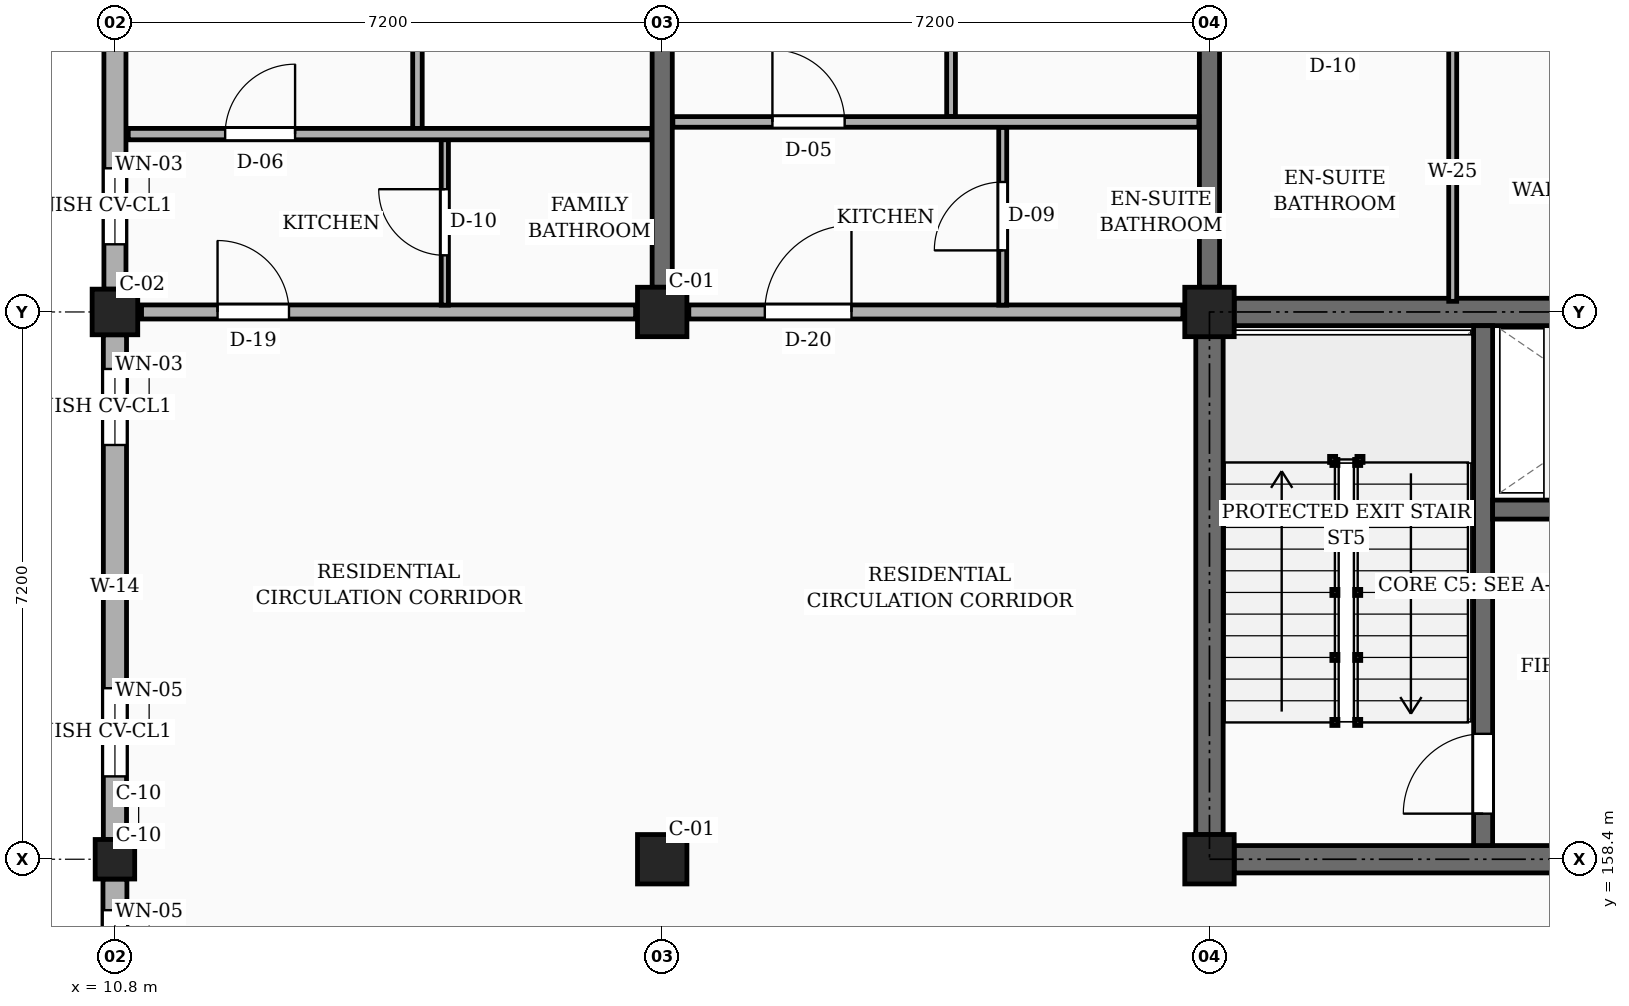
"""IFC4 building model, lengths in metres.
Left out: names, types, materials, properties, quantities, classifications, styles, units other than length and angle.
Written with IfcOpenShell. Run it as: python <this file> out.ifc"""

import sys

from ifc_helpers import new_model, si_unit, direction, frame, frame_2d, origin, origin_2d, place, context, subcontext, project, spatial, rectangle, circle, extrude, element, fill, save


model = new_model("IFC4")
c1 = context("Model", 3, precision=1e-05, world=origin(), true_north=direction((0.0, 1.0)))
c2 = subcontext(c1, "Body", "Model", "MODEL_VIEW")
j1 = project(units=[si_unit("LENGTHUNIT", "METRE"), si_unit("PLANEANGLEUNIT", "RADIAN")], contexts=[c1])
p1 = place(None, origin())
s1 = spatial("IfcSite", under=j1, at=p1, CompositionType="ELEMENT")
p2 = place(p1, origin())
s2 = spatial("IfcBuilding", under=s1, at=p2, CompositionType="ELEMENT")
p3 = place(p2, origin())
s3 = spatial("IfcBuildingStorey", under=s2, at=p3, CompositionType="ELEMENT", Elevation=0.0)
p4 = place(p3, frame((10.8, 158.4, 0.0), z_axis=(0.0, 0.0, 1.0), x_axis=(1.0, 0.0, 0.0)))
e1 = element("IfcColumn", 1, at=p4, inside=s3, PredefinedType="COLUMN", context=c2, shape_type="SweptSolid", body=[
    extrude(circle(Radius=0.26, at=origin_2d()), origin(), (0.0, 0.0, 1.0), 4.5),
])
p5 = place(p3, frame((10.8, 165.6, 0.0), z_axis=(0.0, 0.0, 1.0), x_axis=(1.0, 0.0, 0.0)))
e2 = element("IfcColumn", 2, at=p5, inside=s3, PredefinedType="COLUMN", context=c2, shape_type="SweptSolid", body=[
    extrude(rectangle(XDim=0.6, YDim=0.6, at=origin_2d()), origin(), (0.0, 0.0, 1.0), 4.5),
])
for number, where, z_axis, x_axis in (
    (3, (18.0, 158.4, 0.0), (0.0, 0.0, 1.0), (1.0, 0.0, 0.0)),
    (4, (18.0, 165.6, 0.0), (0.0, 0.0, 1.0), (1.0, 0.0, 0.0)),
    (5, (25.2, 158.4, 0.0), (0.0, 0.0, 1.0), (1.0, 0.0, 0.0)),
    (6, (25.2, 165.6, 0.0), (0.0, 0.0, 1.0), (1.0, 0.0, 0.0)),
):
    element("IfcColumn", number, at=place(p3, frame(where, z_axis=z_axis, x_axis=x_axis)), inside=s3, PredefinedType="COLUMN", context=c2, shape_type="SweptSolid", body=[
        extrude(rectangle(XDim=0.65, YDim=0.65, at=origin_2d()), origin(), (0.0, 0.0, 1.0), 4.5),
    ])
p6 = place(p3, frame((18.0, 165.925, 0.0), z_axis=(0.0, 0.0, 1.0), x_axis=(0.0, 1.0, 0.0)))
e7 = element("IfcWall", 7, at=p6, inside=s3, PredefinedType="SOLIDWALL", context=c2, shape_type="SweptSolid", body=[
    extrude(rectangle(XDim=6.575, YDim=0.265, at=frame_2d((3.288, 0.0))), origin(), (0.0, 0.0, 1.0), 3.535),
])
p7 = place(p3, frame((25.2, 165.925, 0.0), z_axis=(0.0, 0.0, 1.0), x_axis=(0.0, 1.0, 0.0)))
e8 = element("IfcWall", 8, at=p7, inside=s3, PredefinedType="SOLIDWALL", context=c2, shape_type="SweptSolid", body=[
    extrude(rectangle(XDim=6.615, YDim=0.265, at=frame_2d((3.308, 0.0))), origin(), (0.0, 0.0, 1.0), 3.535),
])
p8 = place(p7, frame((4.15, 0.0, 0.0)))
e9 = element("IfcOpeningElement", 9, at=p8, cuts=e8, PredefinedType="OPENING", context=c2, shape_type="SweptSolid", body=[
    extrude(rectangle(XDim=0.98, YDim=2.12, at=frame_2d((0.49, 1.06))), frame((0.0, 0.143, 0.0), z_axis=(0.0, -1.0, 0.0), x_axis=(1.0, 0.0, 0.0)), (0.0, 0.0, 1.0), 0.285),
])
p9 = place(p3, frame((10.8, 172.5, 0.0), z_axis=(0.0, 0.0, 1.0), x_axis=(0.0, -1.0, 0.0)))
e10 = element("IfcWall", 10, at=p9, inside=s3, PredefinedType="SOLIDWALL", context=c2, shape_type="SweptSolid", body=[
    extrude(rectangle(XDim=6.6, YDim=0.29, at=frame_2d((3.3, 0.0))), origin(), (0.0, 0.0, 1.0), 3.805),
])
p10 = place(p9, frame((1.925, 0.0, 0.78)))
e11 = element("IfcOpeningElement", 11, at=p10, cuts=e10, PredefinedType="OPENING", context=c2, shape_type="SweptSolid", body=[
    extrude(rectangle(XDim=0.85, YDim=1.15, at=frame_2d((0.425, 0.575))), frame((0.0, 0.155, 0.0), z_axis=(0.0, -1.0, 0.0), x_axis=(1.0, 0.0, 0.0)), (0.0, 0.0, 1.0), 0.31),
])
p11 = place(p9, frame((5.01, 0.0, 0.78)))
e12 = element("IfcOpeningElement", 12, at=p11, cuts=e10, PredefinedType="OPENING", context=c2, shape_type="SweptSolid", body=[
    extrude(rectangle(XDim=1.0, YDim=1.15, at=frame_2d((0.5, 0.575))), frame((0.0, 0.155, 0.0), z_axis=(0.0, -1.0, 0.0), x_axis=(1.0, 0.0, 0.0)), (0.0, 0.0, 1.0), 0.31),
])
p12 = place(p3, frame((10.8, 165.3, 0.0), z_axis=(0.0, 0.0, 1.0), x_axis=(0.0, -1.0, 0.0)))
e13 = element("IfcWall", 13, at=p12, inside=s3, PredefinedType="SOLIDWALL", context=c2, shape_type="SweptSolid", body=[
    extrude(rectangle(XDim=6.64, YDim=0.305, at=frame_2d((3.32, 0.0))), origin(), (0.0, 0.0, 1.0), 3.805),
])
p13 = place(p12, frame((0.45, 0.0, 0.78)))
e14 = element("IfcOpeningElement", 14, at=p13, cuts=e13, PredefinedType="OPENING", context=c2, shape_type="SweptSolid", body=[
    extrude(rectangle(XDim=1.0, YDim=1.15, at=frame_2d((0.5, 0.575))), frame((0.0, 0.163, 0.0), z_axis=(0.0, -1.0, 0.0), x_axis=(1.0, 0.0, 0.0)), (0.0, 0.0, 1.0), 0.325),
])
p14 = place(p12, frame((4.65, 0.0, 0.78)))
e15 = element("IfcOpeningElement", 15, at=p14, cuts=e13, PredefinedType="OPENING", context=c2, shape_type="SweptSolid", body=[
    extrude(rectangle(XDim=1.16, YDim=1.15, at=frame_2d((0.58, 0.575))), frame((0.0, 0.163, 0.0), z_axis=(0.0, -1.0, 0.0), x_axis=(1.0, 0.0, 0.0)), (0.0, 0.0, 1.0), 0.325),
])
p15 = place(p3, frame((10.8, 158.14, 0.0), z_axis=(0.0, 0.0, 1.0), x_axis=(0.0, -1.0, 0.0)))
e16 = element("IfcWall", 16, at=p15, inside=s3, PredefinedType="SOLIDWALL", context=c2, shape_type="SweptSolid", body=[
    extrude(rectangle(XDim=6.64, YDim=0.315, at=frame_2d((3.32, 0.0))), origin(), (0.0, 0.0, 1.0), 3.805),
])
p16 = place(p15, frame((0.41, 0.0, 0.78)))
e17 = element("IfcOpeningElement", 17, at=p16, cuts=e16, PredefinedType="OPENING", context=c2, shape_type="SweptSolid", body=[
    extrude(rectangle(XDim=1.16, YDim=1.15, at=frame_2d((0.58, 0.575))), frame((0.0, 0.167, 0.0), z_axis=(0.0, -1.0, 0.0), x_axis=(1.0, 0.0, 0.0)), (0.0, 0.0, 1.0), 0.335),
])
p17 = place(p15, frame((2.77, 0.0, 0.78)))
e18 = element("IfcOpeningElement", 18, at=p17, cuts=e16, PredefinedType="OPENING", context=c2, shape_type="SweptSolid", body=[
    extrude(rectangle(XDim=1.32, YDim=1.15, at=frame_2d((0.66, 0.575))), frame((0.0, 0.167, 0.0), z_axis=(0.0, -1.0, 0.0), x_axis=(1.0, 0.0, 0.0)), (0.0, 0.0, 1.0), 0.335),
])
p18 = place(p15, frame((5.32, 0.0, 0.78)))
e19 = element("IfcOpeningElement", 19, at=p18, cuts=e16, PredefinedType="OPENING", context=c2, shape_type="SweptSolid", body=[
    extrude(rectangle(XDim=0.88, YDim=1.26, at=frame_2d((0.44, 0.63))), frame((0.0, 0.167, 0.0), z_axis=(0.0, -1.0, 0.0), x_axis=(1.0, 0.0, 0.0)), (0.0, 0.0, 1.0), 0.335),
])
p19 = place(p3, frame((25.2, 158.725, 0.0), z_axis=(0.0, 0.0, 1.0), x_axis=(0.0, 1.0, 0.0)))
e20 = element("IfcWall", 20, at=p19, inside=s3, PredefinedType="SHEAR", context=c2, shape_type="SweptSolid", body=[
    extrude(rectangle(XDim=6.55, YDim=0.36, at=frame_2d((3.275, 0.0))), origin(), (0.0, 0.0, 1.0), 4.235),
])
p20 = place(p3, frame((25.525, 165.6, 0.0), z_axis=(0.0, 0.0, 1.0), x_axis=(1.0, 0.0, 0.0)))
e21 = element("IfcWall", 21, at=p20, inside=s3, PredefinedType="SHEAR", context=c2, shape_type="SweptSolid", body=[
    extrude(rectangle(XDim=6.55, YDim=0.36, at=frame_2d((3.275, 0.0))), origin(), (0.0, 0.0, 1.0), 4.235),
])
p21 = place(p3, frame((25.525, 158.4, 0.0), z_axis=(0.0, 0.0, 1.0), x_axis=(1.0, 0.0, 0.0)))
e22 = element("IfcWall", 22, at=p21, inside=s3, PredefinedType="SHEAR", context=c2, shape_type="SweptSolid", body=[
    extrude(rectangle(XDim=6.55, YDim=0.36, at=frame_2d((3.275, 0.0))), origin(), (0.0, 0.0, 1.0), 4.235),
])
p22 = place(p21, frame((4.425, 0.0, 0.0)))
e23 = element("IfcOpeningElement", 23, at=p22, cuts=e22, PredefinedType="OPENING", context=c2, shape_type="SweptSolid", body=[
    extrude(rectangle(XDim=1.1, YDim=2.15, at=frame_2d((0.55, 1.075))), frame((0.0, 0.19, 0.0), z_axis=(0.0, -1.0, 0.0), x_axis=(1.0, 0.0, 0.0)), (0.0, 0.0, 1.0), 0.38),
])
p23 = place(p3, frame((28.8, 158.58, 0.0), z_axis=(0.0, 0.0, 1.0), x_axis=(0.0, 1.0, 0.0)))
e24 = element("IfcWall", 24, at=p23, inside=s3, PredefinedType="SHEAR", context=c2, shape_type="SweptSolid", body=[
    extrude(rectangle(XDim=6.84, YDim=0.25, at=frame_2d((3.42, 0.0))), origin(), (0.0, 0.0, 1.0), 4.235),
])
p24 = place(p23, frame((0.42, 0.0, 0.0)))
e25 = element("IfcOpeningElement", 25, at=p24, cuts=e24, PredefinedType="OPENING", context=c2, shape_type="SweptSolid", body=[
    extrude(rectangle(XDim=1.05, YDim=2.15, at=frame_2d((0.525, 1.075))), frame((0.0, 0.135, 0.0), z_axis=(0.0, -1.0, 0.0), x_axis=(1.0, 0.0, 0.0)), (0.0, 0.0, 1.0), 0.27),
])
p25 = place(p3, frame((28.925, 163.0, 0.0), z_axis=(0.0, 0.0, 1.0), x_axis=(1.0, 0.0, 0.0)))
e26 = element("IfcWall", 26, at=p25, inside=s3, PredefinedType="SHEAR", context=c2, shape_type="SweptSolid", body=[
    extrude(rectangle(XDim=3.295, YDim=0.25, at=frame_2d((1.647, 0.0))), origin(), (0.0, 0.0, 1.0), 4.235),
])
p26 = place(p25, frame((1.1, 0.0, 0.0)))
e27 = element("IfcOpeningElement", 27, at=p26, cuts=e26, PredefinedType="OPENING", context=c2, shape_type="SweptSolid", body=[
    extrude(rectangle(XDim=1.1, YDim=2.2, at=frame_2d((0.55, 1.1))), frame((0.0, 0.135, 0.0), z_axis=(0.0, -1.0, 0.0), x_axis=(1.0, 0.0, 0.0)), (0.0, 0.0, 1.0), 0.27),
])
p27 = place(p3, frame((11.15, 165.6, 0.0), z_axis=(0.0, 0.0, 1.0), x_axis=(1.0, 0.0, 0.0)))
e28 = element("IfcWall", 28, at=p27, inside=s3, PredefinedType="PARTITIONING", context=c2, shape_type="SweptSolid", body=[
    extrude(rectangle(XDim=6.5, YDim=0.185, at=frame_2d((3.25, 0.0))), origin(), (0.0, 0.0, 1.0), 3.435),
])
p28 = place(p27, frame((1.0, 0.0, 0.0)))
e29 = element("IfcOpeningElement", 29, at=p28, cuts=e28, PredefinedType="OPENING", context=c2, shape_type="SweptSolid", body=[
    extrude(rectangle(XDim=0.94, YDim=2.12, at=frame_2d((0.47, 1.06))), frame((0.0, 0.103, 0.0), z_axis=(0.0, -1.0, 0.0), x_axis=(1.0, 0.0, 0.0)), (0.0, 0.0, 1.0), 0.205),
])
p29 = place(p3, frame((18.35, 165.6, 0.0), z_axis=(0.0, 0.0, 1.0), x_axis=(1.0, 0.0, 0.0)))
e30 = element("IfcWall", 30, at=p29, inside=s3, PredefinedType="PARTITIONING", context=c2, shape_type="SweptSolid", body=[
    extrude(rectangle(XDim=6.5, YDim=0.185, at=frame_2d((3.25, 0.0))), origin(), (0.0, 0.0, 1.0), 3.435),
])
p30 = place(p29, frame((1.0, 0.0, 0.0)))
e31 = element("IfcOpeningElement", 31, at=p30, cuts=e30, PredefinedType="OPENING", context=c2, shape_type="SweptSolid", body=[
    extrude(rectangle(XDim=1.14, YDim=2.18, at=frame_2d((0.57, 1.09))), frame((0.0, 0.103, 0.0), z_axis=(0.0, -1.0, 0.0), x_axis=(1.0, 0.0, 0.0)), (0.0, 0.0, 1.0), 0.205),
])
p31 = place(p3, frame((14.78, 168.01, 0.0), z_axis=(0.0, 0.0, 1.0), x_axis=(0.0, 1.0, 0.0)))
e32 = element("IfcWall", 32, at=p31, inside=s3, PredefinedType="PARTITIONING", context=c2, shape_type="SweptSolid", body=[
    extrude(rectangle(XDim=4.615, YDim=0.125, at=frame_2d((2.308, 0.0))), origin(), (0.0, 0.0, 1.0), 3.67),
])
p32 = place(p31, frame((1.867, 0.0, 0.0)))
e33 = element("IfcOpeningElement", 33, at=p32, cuts=e32, PredefinedType="OPENING", context=c2, shape_type="SweptSolid", body=[
    extrude(rectangle(XDim=0.88, YDim=2.08, at=frame_2d((0.44, 1.04))), frame((0.0, 0.073, 0.0), z_axis=(0.0, -1.0, 0.0), x_axis=(1.0, 0.0, 0.0)), (0.0, 0.0, 1.0), 0.145),
])
p33 = place(p3, frame((15.14, 165.69, 0.0), z_axis=(0.0, 0.0, 1.0), x_axis=(0.0, 1.0, 0.0)))
e34 = element("IfcWall", 34, at=p33, inside=s3, PredefinedType="PARTITIONING", context=c2, shape_type="SweptSolid", body=[
    extrude(rectangle(XDim=2.18, YDim=0.095, at=frame_2d((1.09, 0.0))), origin(), (0.0, 0.0, 1.0), 3.67),
])
p34 = place(p33, frame((0.655, 0.0, 0.0)))
e35 = element("IfcOpeningElement", 35, at=p34, cuts=e34, PredefinedType="OPENING", context=c2, shape_type="SweptSolid", body=[
    extrude(rectangle(XDim=0.87, YDim=2.05, at=frame_2d((0.435, 1.025))), frame((0.0, 0.058, 0.0), z_axis=(0.0, -1.0, 0.0), x_axis=(1.0, 0.0, 0.0)), (0.0, 0.0, 1.0), 0.115),
])
p35 = place(p3, frame((10.975, 167.94, 0.0), z_axis=(0.0, 0.0, 1.0), x_axis=(1.0, 0.0, 0.0)))
e36 = element("IfcWall", 36, at=p35, inside=s3, PredefinedType="PARTITIONING", context=c2, shape_type="SweptSolid", body=[
    extrude(rectangle(XDim=6.885, YDim=0.15, at=frame_2d((3.442, 0.0))), origin(), (0.0, 0.0, 1.0), 3.67),
])
p36 = place(p35, frame((1.275, 0.0, 0.0)))
e37 = element("IfcOpeningElement", 37, at=p36, cuts=e36, PredefinedType="OPENING", context=c2, shape_type="SweptSolid", body=[
    extrude(rectangle(XDim=0.92, YDim=2.1, at=frame_2d((0.46, 1.05))), frame((0.0, 0.085, 0.0), z_axis=(0.0, -1.0, 0.0), x_axis=(1.0, 0.0, 0.0)), (0.0, 0.0, 1.0), 0.17),
])
p37 = place(p3, frame((21.8, 168.17, 0.0), z_axis=(0.0, 0.0, 1.0), x_axis=(0.0, 1.0, 0.0)))
e38 = element("IfcWall", 38, at=p37, inside=s3, PredefinedType="PARTITIONING", context=c2, shape_type="SweptSolid", body=[
    extrude(rectangle(XDim=4.455, YDim=0.115, at=frame_2d((2.228, 0.0))), origin(), (0.0, 0.0, 1.0), 3.67),
])
p38 = place(p37, frame((1.778, 0.0, 0.0)))
e39 = element("IfcOpeningElement", 39, at=p38, cuts=e38, PredefinedType="OPENING", context=c2, shape_type="SweptSolid", body=[
    extrude(rectangle(XDim=0.9, YDim=2.1, at=frame_2d((0.45, 1.05))), frame((0.0, 0.067, 0.0), z_axis=(0.0, -1.0, 0.0), x_axis=(1.0, 0.0, 0.0)), (0.0, 0.0, 1.0), 0.135),
])
p39 = place(p3, frame((22.48, 165.69, 0.0), z_axis=(0.0, 0.0, 1.0), x_axis=(0.0, 1.0, 0.0)))
e40 = element("IfcWall", 40, at=p39, inside=s3, PredefinedType="PARTITIONING", context=c2, shape_type="SweptSolid", body=[
    extrude(rectangle(XDim=2.34, YDim=0.105, at=frame_2d((1.17, 0.0))), origin(), (0.0, 0.0, 1.0), 3.67),
])
p40 = place(p39, frame((0.72, 0.0, 0.0)))
e41 = element("IfcOpeningElement", 41, at=p40, cuts=e40, PredefinedType="OPENING", context=c2, shape_type="SweptSolid", body=[
    extrude(rectangle(XDim=0.9, YDim=2.05, at=frame_2d((0.45, 1.025))), frame((0.0, 0.062, 0.0), z_axis=(0.0, -1.0, 0.0), x_axis=(1.0, 0.0, 0.0)), (0.0, 0.0, 1.0), 0.125),
])
p41 = place(p3, frame((18.14, 168.1, 0.0), z_axis=(0.0, 0.0, 1.0), x_axis=(1.0, 0.0, 0.0)))
e42 = element("IfcWall", 42, at=p41, inside=s3, PredefinedType="PARTITIONING", context=c2, shape_type="SweptSolid", body=[
    extrude(rectangle(XDim=6.92, YDim=0.14, at=frame_2d((3.46, 0.0))), origin(), (0.0, 0.0, 1.0), 3.67),
])
p42 = place(p41, frame((1.31, 0.0, 0.0)))
e43 = element("IfcOpeningElement", 43, at=p42, cuts=e42, PredefinedType="OPENING", context=c2, shape_type="SweptSolid", body=[
    extrude(rectangle(XDim=0.95, YDim=2.1, at=frame_2d((0.475, 1.05))), frame((0.0, 0.08, 0.0), z_axis=(0.0, -1.0, 0.0), x_axis=(1.0, 0.0, 0.0)), (0.0, 0.0, 1.0), 0.16),
])
p43 = place(p3, frame((28.4, 165.74, 0.0), z_axis=(0.0, 0.0, 1.0), x_axis=(0.0, 1.0, 0.0)))
e44 = element("IfcWall", 44, at=p43, inside=s3, PredefinedType="PARTITIONING", context=c2, shape_type="SweptSolid", body=[
    extrude(rectangle(XDim=3.39, YDim=0.105, at=frame_2d((1.695, 0.0))), origin(), (0.0, 0.0, 1.0), 3.67),
])
p44 = place(p11, origin())
e45 = element("IfcWindow", 45, at=p44, inside=s3, PartitioningType="SINGLE_PANEL", PredefinedType="WINDOW", context=c2, shape_type="SweptSolid", body=[
    extrude(rectangle(XDim=1.0, YDim=1.15, at=frame_2d((0.5, 0.575))), frame((0.0, 0.03, 0.0), z_axis=(0.0, -1.0, 0.0), x_axis=(1.0, 0.0, 0.0)), (0.0, 0.0, 1.0), 0.06),
])
fill(e12, e45)
p45 = place(p13, origin())
e46 = element("IfcWindow", 46, at=p45, inside=s3, PartitioningType="SINGLE_PANEL", PredefinedType="WINDOW", context=c2, shape_type="SweptSolid", body=[
    extrude(rectangle(XDim=1.0, YDim=1.15, at=frame_2d((0.5, 0.575))), frame((0.0, 0.03, 0.0), z_axis=(0.0, -1.0, 0.0), x_axis=(1.0, 0.0, 0.0)), (0.0, 0.0, 1.0), 0.06),
])
fill(e14, e46)
p46 = place(p14, origin())
e47 = element("IfcWindow", 47, at=p46, inside=s3, PartitioningType="SINGLE_PANEL", PredefinedType="WINDOW", context=c2, shape_type="SweptSolid", body=[
    extrude(rectangle(XDim=1.16, YDim=1.15, at=frame_2d((0.58, 0.575))), frame((0.0, 0.03, 0.0), z_axis=(0.0, -1.0, 0.0), x_axis=(1.0, 0.0, 0.0)), (0.0, 0.0, 1.0), 0.06),
])
fill(e15, e47)
p47 = place(p16, origin())
e48 = element("IfcWindow", 48, at=p47, inside=s3, PartitioningType="SINGLE_PANEL", PredefinedType="WINDOW", context=c2, shape_type="SweptSolid", body=[
    extrude(rectangle(XDim=1.16, YDim=1.15, at=frame_2d((0.58, 0.575))), frame((0.0, 0.03, 0.0), z_axis=(0.0, -1.0, 0.0), x_axis=(1.0, 0.0, 0.0)), (0.0, 0.0, 1.0), 0.06),
])
fill(e17, e48)
p48 = place(p24, frame((1.05, 0.0, 0.0), z_axis=(0.0, 0.0, 1.0), x_axis=(-1.0, 0.0, 0.0)))
e49 = element("IfcDoor", 49, at=p48, inside=s3, OperationType="SINGLE_SWING_LEFT", PredefinedType="DOOR", context=c2, shape_type="SweptSolid", body=[
    extrude(rectangle(XDim=1.05, YDim=2.15, at=frame_2d((0.525, 1.075))), frame((0.0, 0.025, 0.0), z_axis=(0.0, -1.0, 0.0), x_axis=(1.0, 0.0, 0.0)), (0.0, 0.0, 1.0), 0.05),
])
fill(e25, e49)
p49 = place(p28, origin())
e50 = element("IfcDoor", 50, at=p49, inside=s3, OperationType="SINGLE_SWING_LEFT", PredefinedType="DOOR", context=c2, shape_type="SweptSolid", body=[
    extrude(rectangle(XDim=0.94, YDim=2.12, at=frame_2d((0.47, 1.06))), frame((0.0, 0.025, 0.0), z_axis=(0.0, -1.0, 0.0), x_axis=(1.0, 0.0, 0.0)), (0.0, 0.0, 1.0), 0.05),
])
fill(e29, e50)
p50 = place(p30, origin())
e51 = element("IfcDoor", 51, at=p50, inside=s3, OperationType="SINGLE_SWING_RIGHT", PredefinedType="DOOR", context=c2, shape_type="SweptSolid", body=[
    extrude(rectangle(XDim=1.14, YDim=2.18, at=frame_2d((0.57, 1.09))), frame((0.0, 0.025, 0.0), z_axis=(0.0, -1.0, 0.0), x_axis=(1.0, 0.0, 0.0)), (0.0, 0.0, 1.0), 0.05),
])
fill(e31, e51)
p51 = place(p34, origin())
e52 = element("IfcDoor", 52, at=p51, inside=s3, OperationType="SINGLE_SWING_RIGHT", PredefinedType="DOOR", context=c2, shape_type="SweptSolid", body=[
    extrude(rectangle(XDim=0.87, YDim=2.05, at=frame_2d((0.435, 1.025))), frame((0.0, 0.025, 0.0), z_axis=(0.0, -1.0, 0.0), x_axis=(1.0, 0.0, 0.0)), (0.0, 0.0, 1.0), 0.05),
])
fill(e35, e52)
p52 = place(p36, origin())
e53 = element("IfcDoor", 53, at=p52, inside=s3, OperationType="SINGLE_SWING_RIGHT", PredefinedType="DOOR", context=c2, shape_type="SweptSolid", body=[
    extrude(rectangle(XDim=0.92, YDim=2.1, at=frame_2d((0.46, 1.05))), frame((0.0, 0.025, 0.0), z_axis=(0.0, -1.0, 0.0), x_axis=(1.0, 0.0, 0.0)), (0.0, 0.0, 1.0), 0.05),
])
fill(e37, e53)
p53 = place(p40, origin())
e54 = element("IfcDoor", 54, at=p53, inside=s3, OperationType="SINGLE_SWING_LEFT", PredefinedType="DOOR", context=c2, shape_type="SweptSolid", body=[
    extrude(rectangle(XDim=0.9, YDim=2.05, at=frame_2d((0.45, 1.025))), frame((0.0, 0.025, 0.0), z_axis=(0.0, -1.0, 0.0), x_axis=(1.0, 0.0, 0.0)), (0.0, 0.0, 1.0), 0.05),
])
fill(e41, e54)
p54 = place(p42, origin())
e55 = element("IfcDoor", 55, at=p54, inside=s3, OperationType="SINGLE_SWING_LEFT", PredefinedType="DOOR", context=c2, shape_type="SweptSolid", body=[
    extrude(rectangle(XDim=0.95, YDim=2.1, at=frame_2d((0.475, 1.05))), frame((0.0, 0.025, 0.0), z_axis=(0.0, -1.0, 0.0), x_axis=(1.0, 0.0, 0.0)), (0.0, 0.0, 1.0), 0.05),
])
fill(e43, e55)
save(model, sys.argv[1])
